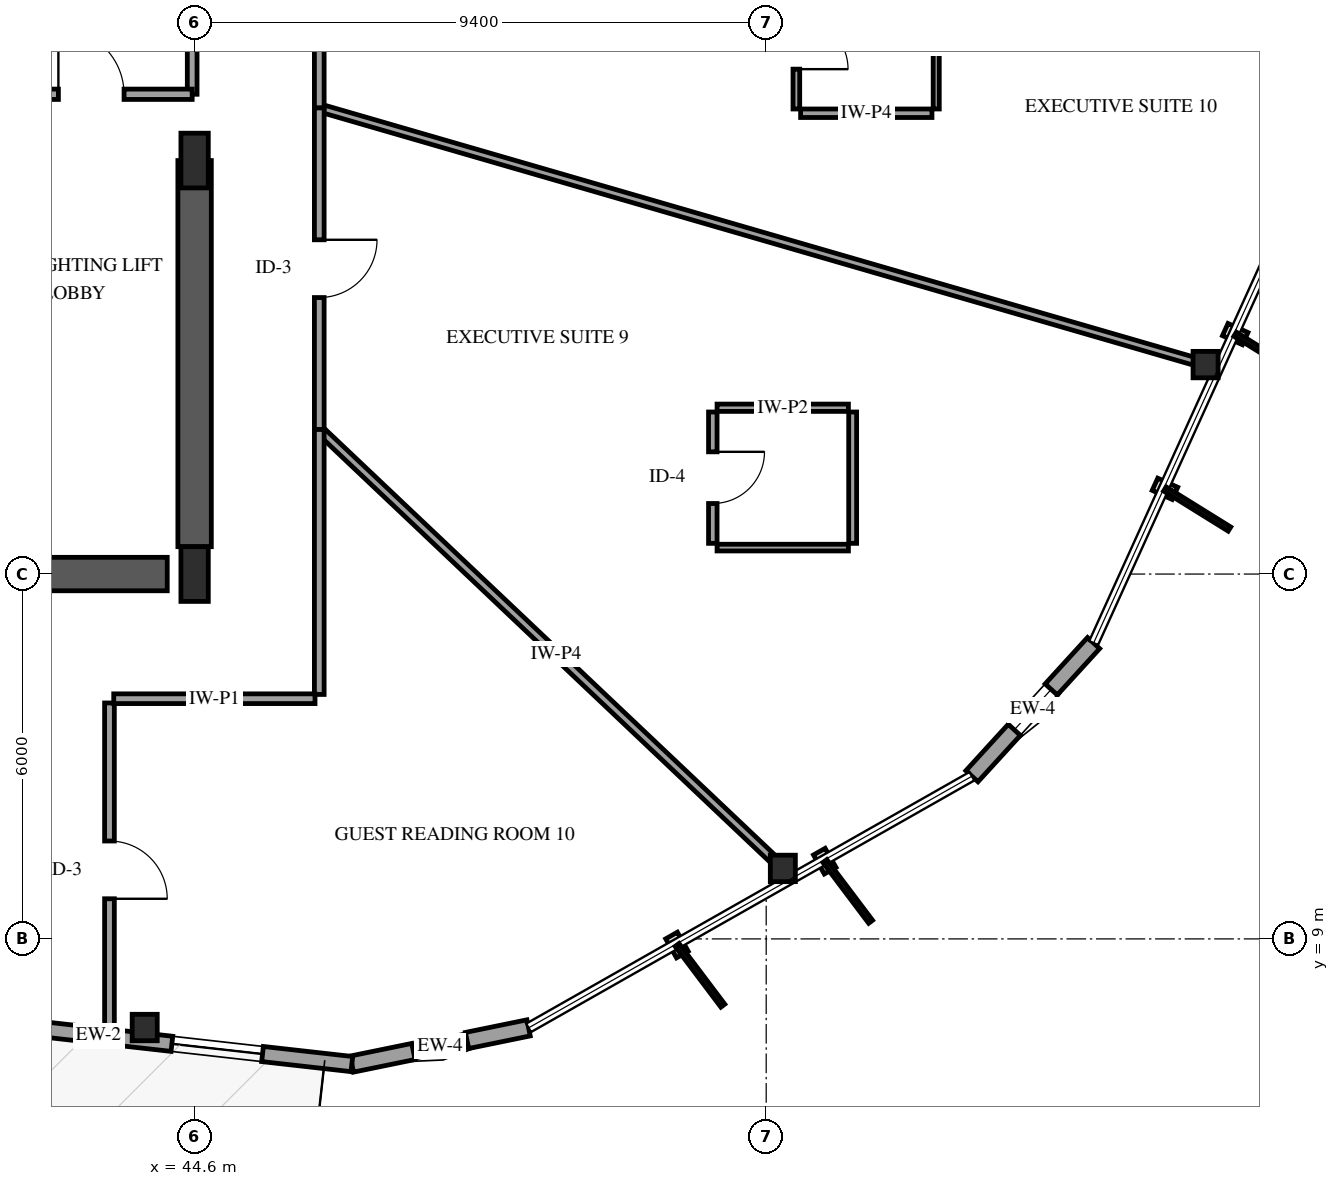
"""IFC4 building model, lengths in metres.
Left out: names, types, materials, properties, quantities, classifications, styles, units other than length and angle.
Written with IfcOpenShell. Run it as: python <this file> out.ifc"""

import sys

from ifc_helpers import new_model, si_unit, direction, frame, frame_2d, origin, origin_2d, place, context, subcontext, project, spatial, rectangle, i_section, extrude, element, fill, save


model = new_model("IFC4")
c1 = context("Model", 3, precision=1e-05, world=origin(), true_north=direction((0.0, 1.0)))
c2 = subcontext(c1, "Body", "Model", "MODEL_VIEW")
j1 = project(units=[si_unit("LENGTHUNIT", "METRE"), si_unit("PLANEANGLEUNIT", "RADIAN")], contexts=[c1])
p1 = place(None, origin())
s1 = spatial("IfcSite", under=j1, at=p1, CompositionType="ELEMENT")
p2 = place(p1, origin())
s2 = spatial("IfcBuilding", under=s1, at=p2, CompositionType="ELEMENT")
p3 = place(p2, frame((0.0, 0.0, 142.6)))
s3 = spatial("IfcBuildingStorey", under=s2, at=p3, CompositionType="ELEMENT", Elevation=142.6)
p4 = place(p3, frame((41.3, 15.0, 0.0), z_axis=(0.0, 0.0, 1.0), x_axis=(1.0, 0.0, 0.0)))
e1 = element("IfcWall", 1, at=p4, inside=s3, PredefinedType="SHEAR", context=c2, shape_type="SweptSolid", body=[
    extrude(rectangle(XDim=2.85, YDim=0.55, at=frame_2d((1.425, 0.0))), origin(), (0.0, 0.0, 1.0), 3.6),
])
p5 = place(p3, frame((44.6, 15.45, 0.0), z_axis=(0.0, 0.0, 1.0), x_axis=(0.0, 1.0, 0.0)))
e2 = element("IfcWall", 2, at=p5, inside=s3, PredefinedType="SHEAR", context=c2, shape_type="SweptSolid", body=[
    extrude(rectangle(XDim=6.35, YDim=0.55, at=frame_2d((3.175, 0.0))), origin(), (0.0, 0.0, 1.0), 3.6),
])
for number, where, z_axis, x_axis in (
    (3, (44.6, 15.0, 0.0), (0.0, 0.0, 1.0), (1.0, 0.0, 0.0)),
    (4, (44.6, 21.8, 0.0), (0.0, 0.0, 1.0), (1.0, 0.0, 0.0)),
):
    element("IfcColumn", number, at=place(p3, frame(where, z_axis=z_axis, x_axis=x_axis)), inside=s3, PredefinedType="PILASTER", context=c2, shape_type="SweptSolid", body=[
        extrude(rectangle(XDim=0.45, YDim=0.9, at=origin_2d()), origin(), (0.0, 0.0, 1.0), 3.6),
    ])
for number, where, z_axis, x_axis in (
    (5, (43.779, 7.542, 0.0), (0.0, 0.0, 1.0), (1.0, 0.0, 0.0)),
    (6, (54.274, 10.159, 0.0), (0.0, 0.0, 1.0), (1.0, 0.0, 0.0)),
    (7, (61.226, 18.444, 0.0), (0.0, 0.0, 1.0), (1.0, 0.0, 0.0)),
):
    element("IfcColumn", number, at=place(p3, frame(where, z_axis=z_axis, x_axis=x_axis)), inside=s3, PredefinedType="COLUMN", context=c2, shape_type="SweptSolid", body=[
        extrude(i_section(OverallWidth=0.412, OverallDepth=0.435, WebThickness=0.036, FlangeThickness=0.057, FilletRadius=0.038, at=origin_2d()), origin(), (0.0, 0.0, 1.0), 3.6),
    ])
p6 = place(p3, frame((47.186, 6.941, 0.0), z_axis=(0.0, 0.0, 1.0), x_axis=(0.97962927764, 0.200814537297, 0.0)))
e8 = element("IfcWall", 8, at=p6, inside=s3, PredefinedType="SOLIDWALL", context=c2, shape_type="SweptSolid", body=[
    extrude(rectangle(XDim=2.967, YDim=0.27, at=frame_2d((1.483, 0.0))), origin(), (0.0, 0.0, 1.0), 2.679),
])
p7 = place(p6, frame((1.033, 0.0, 0.75)))
e9 = element("IfcOpeningElement", 9, at=p7, cuts=e8, PredefinedType="OPENING", context=c2, shape_type="SweptSolid", body=[
    extrude(rectangle(XDim=0.9, YDim=1.5, at=frame_2d((0.45, 0.75))), frame((0.0, 0.145, 0.0), z_axis=(0.0, -1.0, 0.0), x_axis=(1.0, 0.0, 0.0)), (0.0, 0.0, 1.0), 0.29),
])
p8 = place(p3, frame((38.855, 7.879, 0.0), z_axis=(0.0, 0.0, 1.0), x_axis=(0.993727918764, -0.111824968001, 0.0)))
e10 = element("IfcWall", 10, at=p8, inside=s3, PredefinedType="SOLIDWALL", context=c2, shape_type="SweptSolid", body=[
    extrude(rectangle(XDim=8.384, YDim=0.25, at=frame_2d((4.192, 0.0))), origin(), (0.0, 0.0, 1.0), 2.679),
])
p9 = place(p8, frame((0.65, 0.0, 0.0)))
e11 = element("IfcOpeningElement", 11, at=p9, cuts=e10, PredefinedType="OPENING", context=c2, shape_type="SweptSolid", body=[
    extrude(rectangle(XDim=1.0, YDim=2.15, at=frame_2d((0.5, 1.075))), frame((0.0, 0.135, 0.0), z_axis=(0.0, -1.0, 0.0), x_axis=(1.0, 0.0, 0.0)), (0.0, 0.0, 1.0), 0.27),
])
p10 = place(p8, frame((5.405, 0.0, 0.72)))
e12 = element("IfcOpeningElement", 12, at=p10, cuts=e10, PredefinedType="OPENING", context=c2, shape_type="SweptSolid", body=[
    extrude(rectangle(XDim=1.5, YDim=1.7, at=frame_2d((0.75, 0.85))), frame((0.0, 0.135, 0.0), z_axis=(0.0, -1.0, 0.0), x_axis=(1.0, 0.0, 0.0)), (0.0, 0.0, 1.0), 0.27),
])
p11 = place(p3, frame((57.383, 11.675, 0.0), z_axis=(0.0, 0.0, 1.0), x_axis=(0.67449763944, 0.738277003834, 0.0)))
e13 = element("IfcWall", 13, at=p11, inside=s3, PredefinedType="SOLIDWALL", context=c2, shape_type="SweptSolid", body=[
    extrude(rectangle(XDim=2.967, YDim=0.27, at=frame_2d((1.483, 0.0))), origin(), (0.0, 0.0, 1.0), 2.679),
])
p12 = place(p11, frame((1.033, 0.0, 0.75)))
e14 = element("IfcOpeningElement", 14, at=p12, cuts=e13, PredefinedType="OPENING", context=c2, shape_type="SweptSolid", body=[
    extrude(rectangle(XDim=0.9, YDim=1.5, at=frame_2d((0.45, 0.75))), frame((0.0, 0.145, 0.0), z_axis=(0.0, -1.0, 0.0), x_axis=(1.0, 0.0, 0.0)), (0.0, 0.0, 1.0), 0.29),
])
p13 = place(p3, frame((46.65, 22.668, 0.0), z_axis=(0.0, 0.0, 1.0), x_axis=(0.9604993623, -0.278282185957, 0.0)))
e15 = element("IfcWall", 15, at=p13, inside=s3, PredefinedType="PARTITIONING", context=c2, shape_type="SweptSolid", body=[
    extrude(rectangle(XDim=15.394, YDim=0.13, at=frame_2d((7.697, 0.0))), origin(), (0.0, 0.0, 1.0), 3.3),
])
p14 = place(p3, frame((46.65, 17.377, 0.0), z_axis=(0.0, 0.0, 1.0), x_axis=(0.726191917905, -0.687492035132, 0.0)))
e16 = element("IfcWall", 16, at=p14, inside=s3, PredefinedType="PARTITIONING", context=c2, shape_type="SweptSolid", body=[
    extrude(rectangle(XDim=10.725, YDim=0.14, at=frame_2d((5.362, 0.0))), origin(), (0.0, 0.0, 1.0), 2.595),
])
p15 = place(p3, frame((44.56, 29.8, 0.0), z_axis=(0.0, 0.0, 1.0), x_axis=(0.0, -1.0, 0.0)))
e17 = element("IfcWall", 17, at=p15, inside=s3, PredefinedType="PARTITIONING", context=c2, shape_type="SweptSolid", body=[
    extrude(rectangle(XDim=6.91, YDim=0.16, at=frame_2d((3.455, 0.0))), origin(), (0.0, 0.0, 1.0), 2.34),
])
p16 = place(p15, frame((2.915, 0.0, 0.0)))
e18 = element("IfcOpeningElement", 18, at=p16, cuts=e17, PredefinedType="OPENING", context=c2, shape_type="SweptSolid", body=[
    extrude(rectangle(XDim=1.08, YDim=2.15, at=frame_2d((0.54, 1.075))), frame((0.0, 0.09, 0.0), z_axis=(0.0, -1.0, 0.0), x_axis=(1.0, 0.0, 0.0)), (0.0, 0.0, 1.0), 0.18),
])
p17 = place(p3, frame((43.2, 12.88, 0.0), z_axis=(0.0, 0.0, 1.0), x_axis=(0.0, -1.0, 0.0)))
e19 = element("IfcWall", 19, at=p17, inside=s3, PredefinedType="PARTITIONING", context=c2, shape_type="SweptSolid", body=[
    extrude(rectangle(XDim=5.49, YDim=0.16, at=frame_2d((2.745, 0.0))), origin(), (0.0, 0.0, 1.0), 2.595),
])
p18 = place(p17, frame((2.27, 0.0, 0.0)))
e20 = element("IfcOpeningElement", 20, at=p18, cuts=e19, PredefinedType="OPENING", context=c2, shape_type="SweptSolid", body=[
    extrude(rectangle(XDim=0.95, YDim=2.15, at=frame_2d((0.475, 1.075))), frame((0.0, 0.09, 0.0), z_axis=(0.0, -1.0, 0.0), x_axis=(1.0, 0.0, 0.0)), (0.0, 0.0, 1.0), 0.18),
])
p19 = place(p3, frame((46.65, 22.668, 0.0), z_axis=(0.0, 0.0, 1.0), x_axis=(0.0, -1.0, 0.0)))
e21 = element("IfcWall", 21, at=p19, inside=s3, PredefinedType="PARTITIONING", context=c2, shape_type="SweptSolid", body=[
    extrude(rectangle(XDim=5.291, YDim=0.16, at=frame_2d((2.646, 0.0))), origin(), (0.0, 0.0, 1.0), 3.3),
])
p20 = place(p19, frame((2.171, 0.0, 0.0)))
e22 = element("IfcOpeningElement", 22, at=p20, cuts=e21, PredefinedType="OPENING", context=c2, shape_type="SweptSolid", body=[
    extrude(rectangle(XDim=0.95, YDim=2.15, at=frame_2d((0.475, 1.075))), frame((0.0, 0.09, 0.0), z_axis=(0.0, -1.0, 0.0), x_axis=(1.0, 0.0, 0.0)), (0.0, 0.0, 1.0), 0.18),
])
p21 = place(p3, frame((46.65, 17.377, 0.0), z_axis=(0.0, 0.0, 1.0), x_axis=(0.0, -1.0, 0.0)))
e23 = element("IfcWall", 23, at=p21, inside=s3, PredefinedType="PARTITIONING", context=c2, shape_type="SweptSolid", body=[
    extrude(rectangle(XDim=4.357, YDim=0.16, at=frame_2d((2.178, 0.0))), origin(), (0.0, 0.0, 1.0), 3.3),
])
p22 = place(p3, frame((46.65, 26.458, 0.0), z_axis=(0.0, 0.0, 1.0), x_axis=(0.0, -1.0, 0.0)))
e24 = element("IfcWall", 24, at=p22, inside=s3, PredefinedType="PARTITIONING", context=c2, shape_type="SweptSolid", body=[
    extrude(rectangle(XDim=3.79, YDim=0.16, at=frame_2d((1.895, 0.0))), origin(), (0.0, 0.0, 1.0), 3.3),
])
p23 = place(p22, frame((1.42, 0.0, 0.0)))
e25 = element("IfcOpeningElement", 25, at=p23, cuts=e24, PredefinedType="OPENING", context=c2, shape_type="SweptSolid", body=[
    extrude(rectangle(XDim=0.95, YDim=2.15, at=frame_2d((0.475, 1.075))), frame((0.0, 0.09, 0.0), z_axis=(0.0, -1.0, 0.0), x_axis=(1.0, 0.0, 0.0)), (0.0, 0.0, 1.0), 0.18),
])
p24 = place(p3, frame((41.24, 22.89, 0.0), z_axis=(0.0, 0.0, 1.0), x_axis=(1.0, 0.0, 0.0)))
e26 = element("IfcWall", 26, at=p24, inside=s3, PredefinedType="PARTITIONING", context=c2, shape_type="SweptSolid", body=[
    extrude(rectangle(XDim=3.32, YDim=0.17, at=frame_2d((1.66, 0.0))), origin(), (0.0, 0.0, 1.0), 3.3),
])
p25 = place(p24, frame((1.12, 0.0, 0.0)))
e27 = element("IfcOpeningElement", 27, at=p25, cuts=e26, PredefinedType="OPENING", context=c2, shape_type="SweptSolid", body=[
    extrude(rectangle(XDim=1.08, YDim=2.15, at=frame_2d((0.54, 1.075))), frame((0.0, 0.095, 0.0), z_axis=(0.0, -1.0, 0.0), x_axis=(1.0, 0.0, 0.0)), (0.0, 0.0, 1.0), 0.19),
])
p26 = place(p3, frame((46.58, 12.95, 0.0), z_axis=(0.0, 0.0, 1.0), x_axis=(-1.0, 0.0, 0.0)))
e28 = element("IfcWall", 28, at=p26, inside=s3, PredefinedType="PARTITIONING", context=c2, shape_type="SweptSolid", body=[
    extrude(rectangle(XDim=3.31, YDim=0.16, at=frame_2d((1.655, 0.0))), origin(), (0.0, 0.0, 1.0), 3.3),
])
p27 = place(p3, frame((54.496, 24.808, 0.0), z_axis=(0.0, 0.0, 1.0), x_axis=(0.0, -1.0, 0.0)))
e29 = element("IfcWall", 29, at=p27, inside=s3, PredefinedType="PARTITIONING", context=c2, shape_type="SweptSolid", body=[
    extrude(rectangle(XDim=2.16, YDim=0.11, at=frame_2d((1.08, 0.0))), origin(), (0.0, 0.0, 1.0), 3.3),
])
p28 = place(p27, frame((0.655, 0.0, 0.0)))
e30 = element("IfcOpeningElement", 30, at=p28, cuts=e29, PredefinedType="OPENING", context=c2, shape_type="SweptSolid", body=[
    extrude(rectangle(XDim=0.85, YDim=2.1, at=frame_2d((0.425, 1.05))), frame((0.0, 0.065, 0.0), z_axis=(0.0, -1.0, 0.0), x_axis=(1.0, 0.0, 0.0)), (0.0, 0.0, 1.0), 0.13),
])
p29 = place(p3, frame((56.796, 22.648, 0.0), z_axis=(0.0, 0.0, 1.0), x_axis=(0.0, 1.0, 0.0)))
e31 = element("IfcWall", 31, at=p29, inside=s3, PredefinedType="PARTITIONING", context=c2, shape_type="SweptSolid", body=[
    extrude(rectangle(XDim=2.16, YDim=0.1, at=frame_2d((1.08, 0.0))), origin(), (0.0, 0.0, 1.0), 3.3),
])
p30 = place(p3, frame((53.122, 17.665, 0.0), z_axis=(0.0, 0.0, 1.0), x_axis=(0.0, -1.0, 0.0)))
e32 = element("IfcWall", 32, at=p30, inside=s3, PredefinedType="PARTITIONING", context=c2, shape_type="SweptSolid", body=[
    extrude(rectangle(XDim=2.16, YDim=0.14, at=frame_2d((1.08, 0.0))), origin(), (0.0, 0.0, 1.0), 3.3),
])
p31 = place(p30, frame((0.655, 0.0, 0.0)))
e33 = element("IfcOpeningElement", 33, at=p31, cuts=e32, PredefinedType="OPENING", context=c2, shape_type="SweptSolid", body=[
    extrude(rectangle(XDim=0.85, YDim=2.1, at=frame_2d((0.425, 1.05))), frame((0.0, 0.08, 0.0), z_axis=(0.0, -1.0, 0.0), x_axis=(1.0, 0.0, 0.0)), (0.0, 0.0, 1.0), 0.16),
])
p32 = place(p3, frame((55.422, 15.505, 0.0), z_axis=(0.0, 0.0, 1.0), x_axis=(0.0, 1.0, 0.0)))
e34 = element("IfcWall", 34, at=p32, inside=s3, PredefinedType="PARTITIONING", context=c2, shape_type="SweptSolid", body=[
    extrude(rectangle(XDim=2.16, YDim=0.13, at=frame_2d((1.08, 0.0))), origin(), (0.0, 0.0, 1.0), 3.3),
])
p33 = place(p3, frame((55.352, 17.735, 0.0), z_axis=(0.0, 0.0, 1.0), x_axis=(-1.0, 0.0, 0.0)))
e35 = element("IfcWall", 35, at=p33, inside=s3, PredefinedType="PARTITIONING", context=c2, shape_type="SweptSolid", body=[
    extrude(rectangle(XDim=2.16, YDim=0.12, at=frame_2d((1.08, 0.0))), origin(), (0.0, 0.0, 1.0), 3.3),
])
p34 = place(p3, frame((53.192, 15.435, 0.0), z_axis=(0.0, 0.0, 1.0), x_axis=(1.0, 0.0, 0.0)))
e36 = element("IfcWall", 36, at=p34, inside=s3, PredefinedType="PARTITIONING", context=c2, shape_type="SweptSolid", body=[
    extrude(rectangle(XDim=2.16, YDim=0.11, at=frame_2d((1.08, 0.0))), origin(), (0.0, 0.0, 1.0), 3.3),
])
p35 = place(p3, frame((54.566, 22.578, 0.0), z_axis=(0.0, 0.0, 1.0), x_axis=(1.0, 0.0, 0.0)))
e37 = element("IfcWall", 37, at=p35, inside=s3, PredefinedType="PARTITIONING", context=c2, shape_type="SweptSolid", body=[
    extrude(rectangle(XDim=2.16, YDim=0.14, at=frame_2d((1.08, 0.0))), origin(), (0.0, 0.0, 1.0), 3.3),
])
p36 = place(p7, origin())
e38 = element("IfcWindow", 38, at=p36, inside=s3, PartitioningType="SINGLE_PANEL", PredefinedType="WINDOW", context=c2, shape_type="SweptSolid", body=[
    extrude(rectangle(XDim=0.9, YDim=1.5, at=frame_2d((0.45, 0.75))), frame((0.0, 0.03, 0.0), z_axis=(0.0, -1.0, 0.0), x_axis=(1.0, 0.0, 0.0)), (0.0, 0.0, 1.0), 0.06),
])
fill(e9, e38)
p37 = place(p10, origin())
e39 = element("IfcWindow", 39, at=p37, inside=s3, PartitioningType="SINGLE_PANEL", PredefinedType="WINDOW", context=c2, shape_type="SweptSolid", body=[
    extrude(rectangle(XDim=1.5, YDim=1.7, at=frame_2d((0.75, 0.85))), frame((0.0, 0.03, 0.0), z_axis=(0.0, -1.0, 0.0), x_axis=(1.0, 0.0, 0.0)), (0.0, 0.0, 1.0), 0.06),
])
fill(e12, e39)
p38 = place(p12, origin())
e40 = element("IfcWindow", 40, at=p38, inside=s3, PartitioningType="SINGLE_PANEL", PredefinedType="WINDOW", context=c2, shape_type="SweptSolid", body=[
    extrude(rectangle(XDim=0.9, YDim=1.5, at=frame_2d((0.45, 0.75))), frame((0.0, 0.03, 0.0), z_axis=(0.0, -1.0, 0.0), x_axis=(1.0, 0.0, 0.0)), (0.0, 0.0, 1.0), 0.06),
])
fill(e14, e40)
p39 = place(p18, origin())
e41 = element("IfcDoor", 41, at=p39, inside=s3, OperationType="SINGLE_SWING_RIGHT", PredefinedType="DOOR", context=c2, shape_type="SweptSolid", body=[
    extrude(rectangle(XDim=0.95, YDim=2.15, at=frame_2d((0.475, 1.075))), frame((0.0, 0.025, 0.0), z_axis=(0.0, -1.0, 0.0), x_axis=(1.0, 0.0, 0.0)), (0.0, 0.0, 1.0), 0.05),
])
fill(e20, e41)
p40 = place(p20, origin())
e42 = element("IfcDoor", 42, at=p40, inside=s3, OperationType="SINGLE_SWING_LEFT", PredefinedType="DOOR", context=c2, shape_type="SweptSolid", body=[
    extrude(rectangle(XDim=0.95, YDim=2.15, at=frame_2d((0.475, 1.075))), frame((0.0, 0.025, 0.0), z_axis=(0.0, -1.0, 0.0), x_axis=(1.0, 0.0, 0.0)), (0.0, 0.0, 1.0), 0.05),
])
fill(e22, e42)
p41 = place(p25, origin())
e43 = element("IfcDoor", 43, at=p41, inside=s3, OperationType="SINGLE_SWING_LEFT", PredefinedType="DOOR", context=c2, shape_type="SweptSolid", body=[
    extrude(rectangle(XDim=1.08, YDim=2.15, at=frame_2d((0.54, 1.075))), frame((0.0, 0.025, 0.0), z_axis=(0.0, -1.0, 0.0), x_axis=(1.0, 0.0, 0.0)), (0.0, 0.0, 1.0), 0.05),
])
fill(e27, e43)
p42 = place(p28, origin())
e44 = element("IfcDoor", 44, at=p42, inside=s3, OperationType="SINGLE_SWING_RIGHT", PredefinedType="DOOR", context=c2, shape_type="SweptSolid", body=[
    extrude(rectangle(XDim=0.85, YDim=2.1, at=frame_2d((0.425, 1.05))), frame((0.0, 0.025, 0.0), z_axis=(0.0, -1.0, 0.0), x_axis=(1.0, 0.0, 0.0)), (0.0, 0.0, 1.0), 0.05),
])
fill(e30, e44)
p43 = place(p31, origin())
e45 = element("IfcDoor", 45, at=p43, inside=s3, OperationType="SINGLE_SWING_LEFT", PredefinedType="DOOR", context=c2, shape_type="SweptSolid", body=[
    extrude(rectangle(XDim=0.85, YDim=2.1, at=frame_2d((0.425, 1.05))), frame((0.0, 0.025, 0.0), z_axis=(0.0, -1.0, 0.0), x_axis=(1.0, 0.0, 0.0)), (0.0, 0.0, 1.0), 0.05),
])
fill(e33, e45)
save(model, sys.argv[1])
